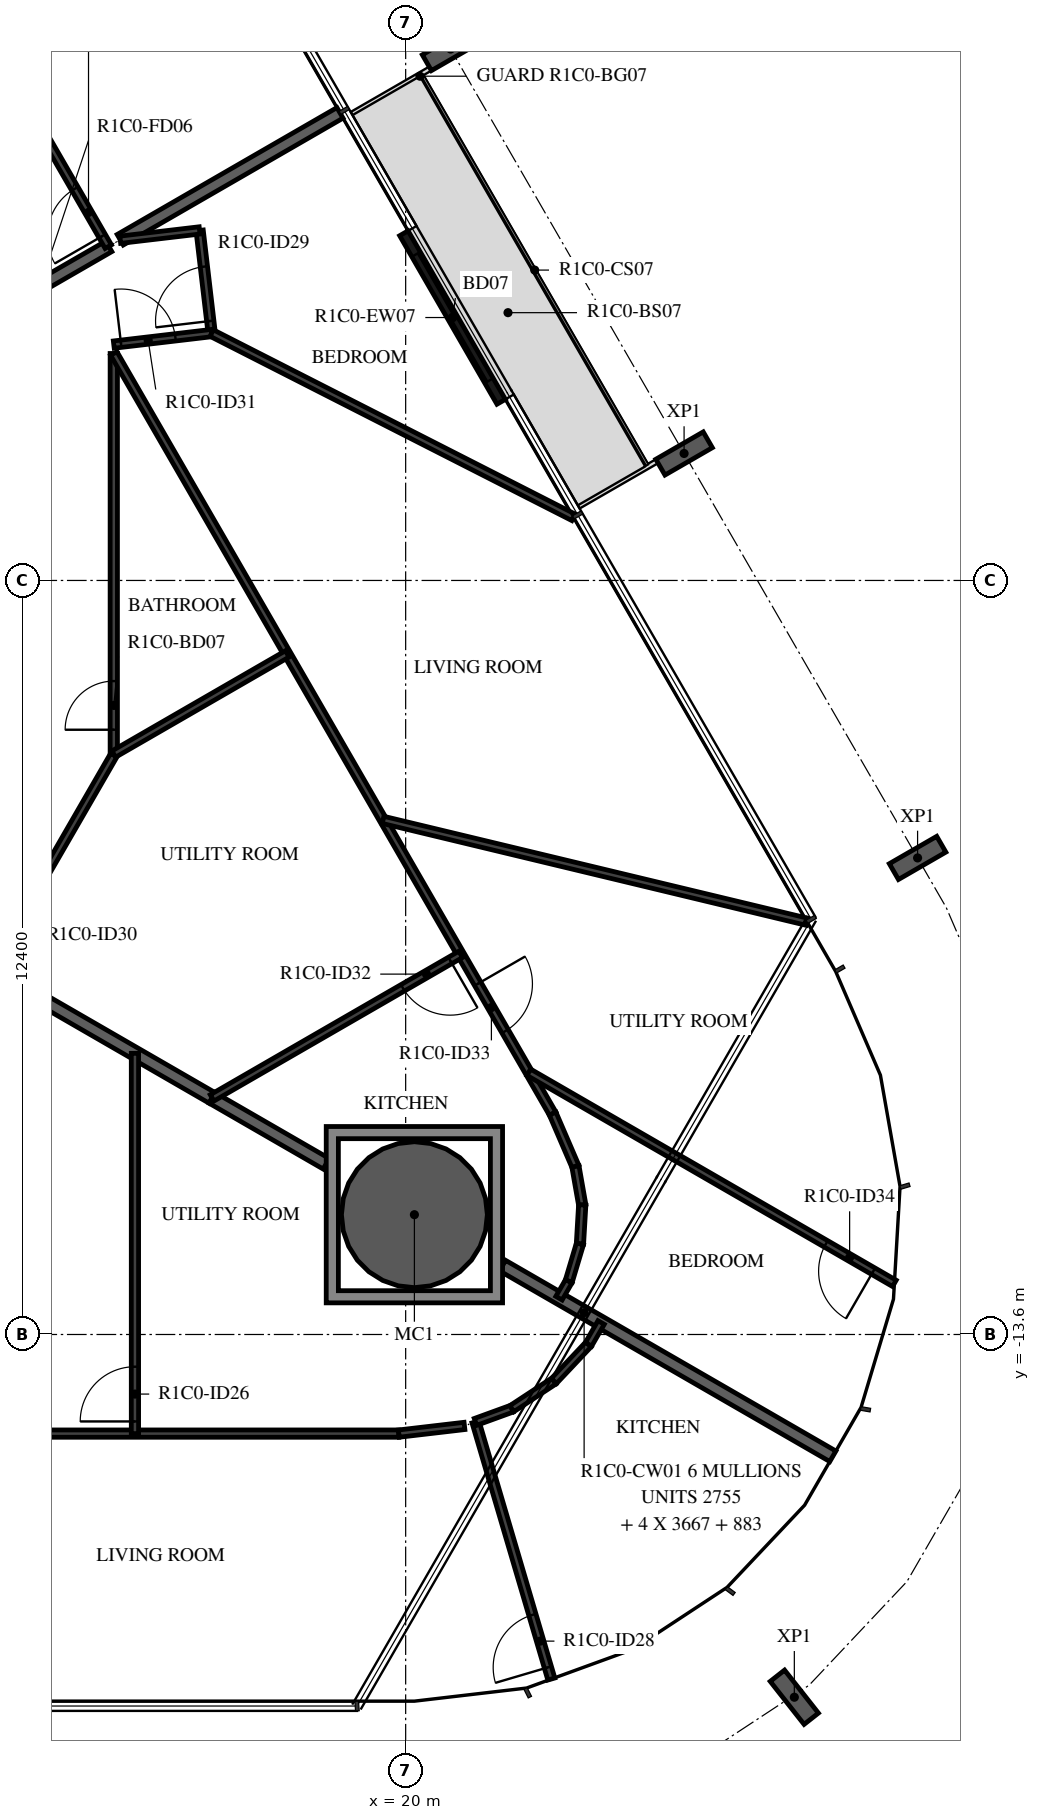
"""IFC4 building model, lengths in metres.
Left out: names, types, materials, properties, quantities, classifications, styles, units other than length and angle.
Written with IfcOpenShell. Run it as: python <this file> out.ifc"""

import sys

from ifc_helpers import new_model, si_unit, direction, frame, frame_2d, origin, origin_2d, place, context, subcontext, project, spatial, polyline, rectangle, hollow_circle, i_section, outline, extrude, element, fill, save


model = new_model("IFC4")
c1 = context("Model", 3, precision=1e-05, world=origin(), true_north=direction((0.0, 1.0)))
c2 = subcontext(c1, "Body", "Model", "MODEL_VIEW")
j1 = project(units=[si_unit("LENGTHUNIT", "METRE"), si_unit("PLANEANGLEUNIT", "RADIAN")], contexts=[c1])
p1 = place(None, origin())
s1 = spatial("IfcSite", under=j1, at=p1, CompositionType="ELEMENT")
p2 = place(p1, origin())
s2 = spatial("IfcBuilding", under=s1, at=p2, CompositionType="ELEMENT")
p3 = place(p2, frame((0.0, 0.0, 66.4)))
s3 = spatial("IfcBuildingStorey", under=s2, at=p3, CompositionType="ELEMENT", Elevation=66.4)
p4 = place(p3, frame((20.144, -11.63, -0.38), z_axis=(0.0, 0.0, 1.0), x_axis=(1.0, 0.0, 0.0)))
e1 = element("IfcColumn", 1, at=p4, inside=s3, PredefinedType="COLUMN", context=c2, shape_type="SweptSolid", body=[
    extrude(hollow_circle(Radius=1.2, WallThickness=0.06, at=origin_2d()), origin(), (0.0, 0.0, 1.0), 2.616),
])
for number, where, z_axis, x_axis in (
    (2, (26.392, -19.565, -0.38), (0.0, 0.0, 1.0), (-0.786, -0.619, 0.0)),
    (3, (28.419, -5.763, -0.38), (0.0, 0.0, 1.0), (0.5, -0.866, 0.0)),
    (4, (24.579, 0.888, -0.38), (0.0, 0.0, 1.0), (0.5, -0.866, 0.0)),
    (5, (20.739, 7.539, -0.38), (0.0, 0.0, 1.0), (0.5, -0.866, 0.0)),
):
    element("IfcColumn", number, at=place(p3, frame(where, z_axis=z_axis, x_axis=x_axis)), inside=s3, PredefinedType="COLUMN", context=c2, shape_type="SweptSolid", body=[
        extrude(i_section(OverallWidth=0.3, OverallDepth=0.9, WebThickness=0.019, FlangeThickness=0.035, FilletRadius=0.03, at=origin_2d()), origin(), (0.0, 0.0, 1.0), 2.616),
    ])
p5 = place(p3, frame((21.571, 1.738, 0.0), z_axis=(0.0, 0.0, 1.0), x_axis=(-0.500028443584, 0.866008981251, 0.0)))
e6 = element("IfcWall", 6, at=p5, inside=s3, PredefinedType="STANDARD", context=c2, shape_type="SweptSolid", body=[
    extrude(rectangle(XDim=3.2, YDim=0.16, at=frame_2d((1.6, 0.0))), origin(), (0.0, 0.0, 1.0), 3.05),
])
p6 = place(p5, frame((0.4, 0.0, 0.0)))
e7 = element("IfcOpeningElement", 7, at=p6, cuts=e6, PredefinedType="OPENING", context=c2, shape_type="SweptSolid", body=[
    extrude(rectangle(XDim=2.4, YDim=2.4, at=frame_2d((1.2, 1.2))), frame((0.0, 0.09, 0.0), z_axis=(0.0, -1.0, 0.0), x_axis=(1.0, 0.0, 0.0)), (0.0, 0.0, 1.0), 0.18),
])
p7 = place(p3, frame((13.7, 3.476, 0.0), z_axis=(0.0, 0.0, 1.0), x_axis=(0.866014281772, 0.500019263395, 0.0)))
e8 = element("IfcWall", 8, at=p7, inside=s3, PredefinedType="STANDARD", context=c2, shape_type="SweptSolid", body=[
    extrude(rectangle(XDim=1.638, YDim=0.2, at=frame_2d((0.819, 0.0))), origin(), (0.0, 0.0, 1.0), 3.05),
])
p8 = place(p3, frame((15.306, 4.403, 0.0), z_axis=(0.0, 0.0, 1.0), x_axis=(0.866013143551, 0.500021234745, 0.0)))
e9 = element("IfcWall", 9, at=p8, inside=s3, PredefinedType="STANDARD", context=c2, shape_type="SweptSolid", body=[
    extrude(rectangle(XDim=4.173, YDim=0.2, at=frame_2d((2.086, 0.0))), origin(), (0.0, 0.0, 1.0), 3.05),
])
p9 = place(p3, frame((16.817, -9.709, 0.0), z_axis=(0.0, 0.0, 1.0), x_axis=(-0.86604338933, 0.499968846828, 0.0)))
e10 = element("IfcWall", 10, at=p9, inside=s3, PredefinedType="STANDARD", context=c2, shape_type="SweptSolid", body=[
    extrude(rectangle(XDim=5.718, YDim=0.2, at=frame_2d((2.859, 0.0))), origin(), (0.0, 0.0, 1.0), 3.05),
])
p10 = place(p3, frame((27.025, -15.603, 0.0), z_axis=(0.0, 0.0, 1.0), x_axis=(-0.866030653443, 0.499990907215, 0.0)))
e11 = element("IfcWall", 11, at=p10, inside=s3, PredefinedType="STANDARD", context=c2, shape_type="SweptSolid", body=[
    extrude(rectangle(XDim=6.271, YDim=0.2, at=frame_2d((3.136, 0.0))), origin(), (0.0, 0.0, 1.0), 3.05),
])
p11 = place(p3, frame((18.694, -10.793, 0.0), z_axis=(0.0, 0.0, 1.0), x_axis=(-0.866009251978, 0.500027974705, 0.0)))
e12 = element("IfcWall", 12, at=p11, inside=s3, PredefinedType="STANDARD", context=c2, shape_type="SweptSolid", body=[
    extrude(rectangle(XDim=2.167, YDim=0.2, at=frame_2d((1.084, 0.0))), origin(), (0.0, 0.0, 1.0), 3.05),
])
p12 = place(p3, frame((15.11, 4.289, 0.0), z_axis=(0.0, 0.0, 1.0), x_axis=(-0.500033654285, 0.866005972602, 0.0)))
e13 = element("IfcWall", 13, at=p12, inside=s3, PredefinedType="PARTITIONING", context=c2, shape_type="SweptSolid", body=[
    extrude(rectangle(XDim=5.003, YDim=0.12, at=frame_2d((2.501, 0.0))), origin(), (0.0, 0.0, 1.0), 3.05),
])
p13 = place(p12, frame((0.2, 0.0, 0.0)))
e14 = element("IfcOpeningElement", 14, at=p13, cuts=e13, PredefinedType="OPENING", context=c2, shape_type="SweptSolid", body=[
    extrude(rectangle(XDim=0.9, YDim=2.1, at=frame_2d((0.45, 1.05))), frame((0.0, 0.07, 0.0), z_axis=(0.0, -1.0, 0.0), x_axis=(1.0, 0.0, 0.0)), (0.0, 0.0, 1.0), 0.14),
])
p14 = place(p3, frame((7.881, -15.23, 0.0), z_axis=(0.0, 0.0, 1.0), x_axis=(1.0, 0.0, 0.0)))
e15 = element("IfcWall", 15, at=p14, inside=s3, PredefinedType="PARTITIONING", context=c2, shape_type="SweptSolid", body=[
    extrude(rectangle(XDim=12.006, YDim=0.12, at=frame_2d((6.003, 0.0))), origin(), (0.0, 0.0, 1.0), 3.05),
])
p15 = place(p14, frame((1.499, 0.0, 0.0)))
e16 = element("IfcOpeningElement", 16, at=p15, cuts=e15, PredefinedType="OPENING", context=c2, shape_type="SweptSolid", body=[
    extrude(rectangle(XDim=0.9, YDim=2.1, at=frame_2d((0.45, 1.05))), frame((0.0, 0.07, 0.0), z_axis=(0.0, -1.0, 0.0), x_axis=(1.0, 0.0, 0.0)), (0.0, 0.0, 1.0), 0.14),
])
p16 = place(p3, frame((15.548, -15.23, 0.0), z_axis=(0.0, 0.0, 1.0), x_axis=(0.0, 1.0, 0.0)))
e17 = element("IfcWall", 17, at=p16, inside=s3, PredefinedType="PARTITIONING", context=c2, shape_type="SweptSolid", body=[
    extrude(rectangle(XDim=6.253, YDim=0.12, at=frame_2d((3.127, 0.0))), origin(), (0.0, 0.0, 1.0), 3.05),
])
p17 = place(p16, frame((0.2, 0.0, 0.0)))
e18 = element("IfcOpeningElement", 18, at=p17, cuts=e17, PredefinedType="OPENING", context=c2, shape_type="SweptSolid", body=[
    extrude(rectangle(XDim=0.9, YDim=2.1, at=frame_2d((0.45, 1.05))), frame((0.0, 0.07, 0.0), z_axis=(0.0, -1.0, 0.0), x_axis=(1.0, 0.0, 0.0)), (0.0, 0.0, 1.0), 0.14),
])
p18 = place(p3, frame((20.967, -15.104, 0.0), z_axis=(0.0, 0.0, 1.0), x_axis=(-0.993231641151, -0.116150363826, 0.0)))
e19 = element("IfcWall", 19, at=p18, inside=s3, PredefinedType="PARTITIONING", context=c2, shape_type="SweptSolid", body=[
    extrude(rectangle(XDim=1.087, YDim=0.12, at=frame_2d((0.543, 0.0))), origin(), (0.0, 0.0, 1.0), 3.05),
])
p19 = place(p3, frame((22.396, -19.266, 0.0), z_axis=(0.0, 0.0, 1.0), x_axis=(-0.282873823334, 0.959157130022, 0.0)))
e20 = element("IfcWall", 20, at=p19, inside=s3, PredefinedType="PARTITIONING", context=c2, shape_type="SweptSolid", body=[
    extrude(rectangle(XDim=4.409, YDim=0.12, at=frame_2d((2.204, 0.0))), origin(), (0.0, 0.0, 1.0), 3.05),
])
p20 = place(p19, frame((0.2, 0.0, 0.0)))
e21 = element("IfcOpeningElement", 21, at=p20, cuts=e20, PredefinedType="OPENING", context=c2, shape_type="SweptSolid", body=[
    extrude(rectangle(XDim=0.9, YDim=2.1, at=frame_2d((0.45, 1.05))), frame((0.0, 0.07, 0.0), z_axis=(0.0, -1.0, 0.0), x_axis=(1.0, 0.0, 0.0)), (0.0, 0.0, 1.0), 0.14),
])
p21 = place(p3, frame((21.149, -15.038, 0.0), z_axis=(0.0, 0.0, 1.0), x_axis=(0.939726102094, 0.341928140173, 0.0)))
e22 = element("IfcWall", 22, at=p21, inside=s3, PredefinedType="PARTITIONING", context=c2, shape_type="SweptSolid", body=[
    extrude(rectangle(XDim=0.635, YDim=0.12, at=frame_2d((0.318, 0.0))), origin(), (0.0, 0.0, 1.0), 3.05),
])
p22 = place(p3, frame((21.746, -14.82, 0.0), z_axis=(0.0, 0.0, 1.0), x_axis=(0.835477570013, 0.549524549046, 0.0)))
e23 = element("IfcWall", 23, at=p22, inside=s3, PredefinedType="PARTITIONING", context=c2, shape_type="SweptSolid", body=[
    extrude(rectangle(XDim=0.829, YDim=0.12, at=frame_2d((0.415, 0.0))), origin(), (0.0, 0.0, 1.0), 3.05),
])
p23 = place(p3, frame((22.438, -14.365, 0.0), z_axis=(0.0, 0.0, 1.0), x_axis=(0.686182189596, 0.727429723535, 0.0)))
e24 = element("IfcWall", 24, at=p23, inside=s3, PredefinedType="PARTITIONING", context=c2, shape_type="SweptSolid", body=[
    extrude(rectangle(XDim=0.829, YDim=0.12, at=frame_2d((0.414, 0.0))), origin(), (0.0, 0.0, 1.0), 3.05),
])
p24 = place(p3, frame((23.007, -13.762, 0.0), z_axis=(0.0, 0.0, 1.0), x_axis=(0.499875358948, 0.866097353371, 0.0)))
e25 = element("IfcWall", 25, at=p24, inside=s3, PredefinedType="PARTITIONING", context=c2, shape_type="SweptSolid", body=[
    extrude(rectangle(XDim=0.415, YDim=0.12, at=frame_2d((0.207, 0.0))), origin(), (0.0, 0.0, 1.0), 3.05),
])
p25 = place(p3, frame((16.81, 2.868, 0.0), z_axis=(0.0, 0.0, 1.0), x_axis=(-0.117049566217, 0.993126074096, 0.0)))
e26 = element("IfcWall", 26, at=p25, inside=s3, PredefinedType="PARTITIONING", context=c2, shape_type="SweptSolid", body=[
    extrude(rectangle(XDim=1.7, YDim=0.12, at=frame_2d((0.85, 0.0))), origin(), (0.0, 0.0, 1.0), 3.05),
])
p26 = place(p25, frame((0.2, 0.0, 0.0)))
e27 = element("IfcOpeningElement", 27, at=p26, cuts=e26, PredefinedType="OPENING", context=c2, shape_type="SweptSolid", body=[
    extrude(rectangle(XDim=0.9, YDim=2.1, at=frame_2d((0.45, 1.05))), frame((0.0, 0.07, 0.0), z_axis=(0.0, -1.0, 0.0), x_axis=(1.0, 0.0, 0.0)), (0.0, 0.0, 1.0), 0.14),
])
p27 = place(p3, frame((16.611, 4.556, 0.0), z_axis=(0.0, 0.0, 1.0), x_axis=(-0.993151872114, -0.116830470836, 0.0)))
e28 = element("IfcWall", 28, at=p27, inside=s3, PredefinedType="PARTITIONING", context=c2, shape_type="SweptSolid", body=[
    extrude(rectangle(XDim=1.314, YDim=0.12, at=frame_2d((0.657, 0.0))), origin(), (0.0, 0.0, 1.0), 3.05),
])
p28 = place(p3, frame((13.164, -7.6, 0.0), z_axis=(0.0, 0.0, 1.0), x_axis=(0.499974973053, 0.866039852617, 0.0)))
e29 = element("IfcWall", 29, at=p28, inside=s3, PredefinedType="PARTITIONING", context=c2, shape_type="SweptSolid", body=[
    extrude(rectangle(XDim=4.073, YDim=0.12, at=frame_2d((2.037, 0.0))), origin(), (0.0, 0.0, 1.0), 3.05),
])
p29 = place(p28, frame((0.2, 0.0, 0.0)))
e30 = element("IfcOpeningElement", 30, at=p29, cuts=e29, PredefinedType="OPENING", context=c2, shape_type="SweptSolid", body=[
    extrude(rectangle(XDim=0.9, YDim=2.1, at=frame_2d((0.45, 1.05))), frame((0.0, 0.07, 0.0), z_axis=(0.0, -1.0, 0.0), x_axis=(1.0, 0.0, 0.0)), (0.0, 0.0, 1.0), 0.14),
])
p30 = place(p3, frame((15.2, 2.679, 0.0), z_axis=(0.0, 0.0, 1.0), x_axis=(0.993150604323, 0.116841247567, 0.0)))
e31 = element("IfcWall", 31, at=p30, inside=s3, PredefinedType="PARTITIONING", context=c2, shape_type="SweptSolid", body=[
    extrude(rectangle(XDim=1.621, YDim=0.12, at=frame_2d((0.811, 0.0))), origin(), (0.0, 0.0, 1.0), 3.05),
])
p31 = place(p30, frame((0.12, 0.0, 0.0)))
e32 = element("IfcOpeningElement", 32, at=p31, cuts=e31, PredefinedType="OPENING", context=c2, shape_type="SweptSolid", body=[
    extrude(rectangle(XDim=0.9, YDim=2.1, at=frame_2d((0.45, 1.05))), frame((0.0, 0.07, 0.0), z_axis=(0.0, -1.0, 0.0), x_axis=(1.0, 0.0, 0.0)), (0.0, 0.0, 1.0), 0.14),
])
p32 = place(p3, frame((15.2, -4.055, 0.0), z_axis=(0.0, 0.0, 1.0), x_axis=(0.0, 1.0, 0.0)))
e33 = element("IfcWall", 33, at=p32, inside=s3, PredefinedType="PARTITIONING", context=c2, shape_type="SweptSolid", body=[
    extrude(rectangle(XDim=6.588, YDim=0.12, at=frame_2d((3.294, 0.0))), origin(), (0.0, 0.0, 1.0), 3.05),
])
p33 = place(p32, frame((0.4, 0.0, 0.0)))
e34 = element("IfcOpeningElement", 34, at=p33, cuts=e33, PredefinedType="OPENING", context=c2, shape_type="SweptSolid", body=[
    extrude(rectangle(XDim=0.8, YDim=2.1, at=frame_2d((0.4, 1.05))), frame((0.0, 0.07, 0.0), z_axis=(0.0, -1.0, 0.0), x_axis=(1.0, 0.0, 0.0)), (0.0, 0.0, 1.0), 0.14),
])
p34 = place(p3, frame((16.81, 2.868, 0.0), z_axis=(0.0, 0.0, 1.0), x_axis=(0.891097252128, -0.453812392128, 0.0)))
e35 = element("IfcWall", 35, at=p34, inside=s3, PredefinedType="PARTITIONING", context=c2, shape_type="SweptSolid", body=[
    extrude(rectangle(XDim=6.677, YDim=0.12, at=frame_2d((3.338, 0.0))), origin(), (0.0, 0.0, 1.0), 3.05),
])
p35 = place(p3, frame((15.2, 2.533, 0.0), z_axis=(0.0, 0.0, 1.0), x_axis=(0.500001127339, -0.866024752914, 0.0)))
e36 = element("IfcWall", 36, at=p35, inside=s3, PredefinedType="PARTITIONING", context=c2, shape_type="SweptSolid", body=[
    extrude(rectangle(XDim=14.434, YDim=0.12, at=frame_2d((7.217, 0.0))), origin(), (0.0, 0.0, 1.0), 3.05),
])
p36 = place(p35, frame((11.97, 0.0, 0.0)))
e37 = element("IfcOpeningElement", 37, at=p36, cuts=e36, PredefinedType="OPENING", context=c2, shape_type="SweptSolid", body=[
    extrude(rectangle(XDim=0.9, YDim=2.1, at=frame_2d((0.45, 1.05))), frame((0.0, 0.07, 0.0), z_axis=(0.0, -1.0, 0.0), x_axis=(1.0, 0.0, 0.0)), (0.0, 0.0, 1.0), 0.14),
])
p37 = place(p3, frame((22.417, -9.968, 0.0), z_axis=(0.0, 0.0, 1.0), x_axis=(0.395971779074, -0.918262680379, 0.0)))
e38 = element("IfcWall", 38, at=p37, inside=s3, PredefinedType="PARTITIONING", context=c2, shape_type="SweptSolid", body=[
    extrude(rectangle(XDim=0.947, YDim=0.12, at=frame_2d((0.474, 0.0))), origin(), (0.0, 0.0, 1.0), 3.05),
])
p38 = place(p3, frame((22.792, -10.837, 0.0), z_axis=(0.0, 0.0, 1.0), x_axis=(0.17382873157, -0.984775899421, 0.0)))
e39 = element("IfcWall", 39, at=p38, inside=s3, PredefinedType="PARTITIONING", context=c2, shape_type="SweptSolid", body=[
    extrude(rectangle(XDim=0.642, YDim=0.12, at=frame_2d((0.321, 0.0))), origin(), (0.0, 0.0, 1.0), 3.05),
])
p39 = place(p3, frame((22.904, -11.469, 0.0), z_axis=(0.0, 0.0, 1.0), x_axis=(-0.05820906079, -0.998304415117, 0.0)))
e40 = element("IfcWall", 40, at=p39, inside=s3, PredefinedType="PARTITIONING", context=c2, shape_type="SweptSolid", body=[
    extrude(rectangle(XDim=0.642, YDim=0.12, at=frame_2d((0.321, 0.0))), origin(), (0.0, 0.0, 1.0), 3.05),
])
p40 = place(p3, frame((22.866, -12.11, 0.0), z_axis=(0.0, 0.0, 1.0), x_axis=(-0.286754684479, -0.958004045362, 0.0)))
e41 = element("IfcWall", 41, at=p40, inside=s3, PredefinedType="PARTITIONING", context=c2, shape_type="SweptSolid", body=[
    extrude(rectangle(XDim=0.642, YDim=0.12, at=frame_2d((0.321, 0.0))), origin(), (0.0, 0.0, 1.0), 3.05),
])
p41 = place(p3, frame((22.682, -12.725, 0.0), z_axis=(0.0, 0.0, 1.0), x_axis=(-0.500226934229, -0.865894343596, 0.0)))
e42 = element("IfcWall", 42, at=p41, inside=s3, PredefinedType="PARTITIONING", context=c2, shape_type="SweptSolid", body=[
    extrude(rectangle(XDim=0.321, YDim=0.12, at=frame_2d((0.161, 0.0))), origin(), (0.0, 0.0, 1.0), 3.05),
])
p42 = place(p3, frame((28.037, -12.759, 0.0), z_axis=(0.0, 0.0, 1.0), x_axis=(-0.866009909538, 0.500026835863, 0.0)))
e43 = element("IfcWall", 43, at=p42, inside=s3, PredefinedType="PARTITIONING", context=c2, shape_type="SweptSolid", body=[
    extrude(rectangle(XDim=6.943, YDim=0.12, at=frame_2d((3.471, 0.0))), origin(), (0.0, 0.0, 1.0), 3.05),
])
p43 = place(p42, frame((0.4, 0.0, 0.0)))
e44 = element("IfcOpeningElement", 44, at=p43, cuts=e43, PredefinedType="OPENING", context=c2, shape_type="SweptSolid", body=[
    extrude(rectangle(XDim=0.9, YDim=2.1, at=frame_2d((0.45, 1.05))), frame((0.0, 0.07, 0.0), z_axis=(0.0, -1.0, 0.0), x_axis=(1.0, 0.0, 0.0)), (0.0, 0.0, 1.0), 0.14),
])
p44 = place(p3, frame((20.905, -7.349, 0.0), z_axis=(0.0, 0.0, 1.0), x_axis=(-0.866032292145, -0.49998806882, 0.0)))
e45 = element("IfcWall", 45, at=p44, inside=s3, PredefinedType="PARTITIONING", context=c2, shape_type="SweptSolid", body=[
    extrude(rectangle(XDim=4.721, YDim=0.12, at=frame_2d((2.36, 0.0))), origin(), (0.0, 0.0, 1.0), 3.05),
])
p45 = place(p44, frame((0.2, 0.0, 0.0)))
e46 = element("IfcOpeningElement", 46, at=p45, cuts=e45, PredefinedType="OPENING", context=c2, shape_type="SweptSolid", body=[
    extrude(rectangle(XDim=0.9, YDim=2.1, at=frame_2d((0.45, 1.05))), frame((0.0, 0.07, 0.0), z_axis=(0.0, -1.0, 0.0), x_axis=(1.0, 0.0, 0.0)), (0.0, 0.0, 1.0), 0.14),
])
p46 = place(p3, frame((18.052, -2.408, 0.0), z_axis=(0.0, 0.0, 1.0), x_axis=(-0.866017718408, -0.500013311227, 0.0)))
e47 = element("IfcWall", 47, at=p46, inside=s3, PredefinedType="PARTITIONING", context=c2, shape_type="SweptSolid", body=[
    extrude(rectangle(XDim=3.294, YDim=0.12, at=frame_2d((1.647, 0.0))), origin(), (0.0, 0.0, 1.0), 3.05),
])
p47 = place(p3, frame((26.6, -6.813, 0.0), z_axis=(0.0, 0.0, 1.0), x_axis=(-0.972307508101, 0.23370517686, 0.0)))
e48 = element("IfcWall", 48, at=p47, inside=s3, PredefinedType="PARTITIONING", context=c2, shape_type="SweptSolid", body=[
    extrude(rectangle(XDim=7.17, YDim=0.12, at=frame_2d((3.585, 0.0))), origin(), (0.0, 0.0, 1.0), 3.05),
])
p48 = place(p3, origin())
e49 = element("IfcWall", 49, at=p48, inside=s3, PredefinedType="STANDARD", context=c2, shape_type="SweptSolid", body=[
    extrude(outline(polyline([(21.594, -10.18), (21.594, -13.08), (18.694, -13.08), (18.694, -10.18), (21.594, -10.18)]), holes=[polyline([(18.894, -12.88), (21.394, -12.88), (21.394, -10.38), (18.894, -10.38), (18.894, -12.88)])]), origin(), (0.0, 0.0, 1.0), 3.05),
])
p49 = place(p6, origin())
e50 = element("IfcDoor", 50, at=p49, inside=s3, OperationType="DOUBLE_DOOR_SLIDING", PredefinedType="DOOR", context=c2, shape_type="SweptSolid", body=[
    extrude(rectangle(XDim=2.4, YDim=2.4, at=frame_2d((1.2, 1.2))), frame((0.0, 0.025, 0.0), z_axis=(0.0, -1.0, 0.0), x_axis=(1.0, 0.0, 0.0)), (0.0, 0.0, 1.0), 0.05),
])
fill(e7, e50)
p50 = place(p13, origin())
e51 = element("IfcDoor", 51, at=p50, inside=s3, OperationType="SINGLE_SWING_LEFT", PredefinedType="DOOR", context=c2, shape_type="SweptSolid", body=[
    extrude(rectangle(XDim=0.9, YDim=2.1, at=frame_2d((0.45, 1.05))), frame((0.0, 0.025, 0.0), z_axis=(0.0, -1.0, 0.0), x_axis=(1.0, 0.0, 0.0)), (0.0, 0.0, 1.0), 0.05),
])
fill(e14, e51)
p51 = place(p17, origin())
e52 = element("IfcDoor", 52, at=p51, inside=s3, OperationType="SINGLE_SWING_RIGHT", PredefinedType="DOOR", context=c2, shape_type="SweptSolid", body=[
    extrude(rectangle(XDim=0.9, YDim=2.1, at=frame_2d((0.45, 1.05))), frame((0.0, 0.025, 0.0), z_axis=(0.0, -1.0, 0.0), x_axis=(1.0, 0.0, 0.0)), (0.0, 0.0, 1.0), 0.05),
])
fill(e18, e52)
p52 = place(p20, origin())
e53 = element("IfcDoor", 53, at=p52, inside=s3, OperationType="SINGLE_SWING_RIGHT", PredefinedType="DOOR", context=c2, shape_type="SweptSolid", body=[
    extrude(rectangle(XDim=0.9, YDim=2.1, at=frame_2d((0.45, 1.05))), frame((0.0, 0.025, 0.0), z_axis=(0.0, -1.0, 0.0), x_axis=(1.0, 0.0, 0.0)), (0.0, 0.0, 1.0), 0.05),
])
fill(e21, e53)
p53 = place(p26, origin())
e54 = element("IfcDoor", 54, at=p53, inside=s3, OperationType="SINGLE_SWING_LEFT", PredefinedType="DOOR", context=c2, shape_type="SweptSolid", body=[
    extrude(rectangle(XDim=0.9, YDim=2.1, at=frame_2d((0.45, 1.05))), frame((0.0, 0.025, 0.0), z_axis=(0.0, -1.0, 0.0), x_axis=(1.0, 0.0, 0.0)), (0.0, 0.0, 1.0), 0.05),
])
fill(e27, e54)
p54 = place(p31, origin())
e55 = element("IfcDoor", 55, at=p54, inside=s3, OperationType="SINGLE_SWING_RIGHT", PredefinedType="DOOR", context=c2, shape_type="SweptSolid", body=[
    extrude(rectangle(XDim=0.9, YDim=2.1, at=frame_2d((0.45, 1.05))), frame((0.0, 0.025, 0.0), z_axis=(0.0, -1.0, 0.0), x_axis=(1.0, 0.0, 0.0)), (0.0, 0.0, 1.0), 0.05),
])
fill(e32, e55)
p55 = place(p33, origin())
e56 = element("IfcDoor", 56, at=p55, inside=s3, OperationType="SINGLE_SWING_LEFT", PredefinedType="DOOR", context=c2, shape_type="SweptSolid", body=[
    extrude(rectangle(XDim=0.8, YDim=2.1, at=frame_2d((0.4, 1.05))), frame((0.0, 0.025, 0.0), z_axis=(0.0, -1.0, 0.0), x_axis=(1.0, 0.0, 0.0)), (0.0, 0.0, 1.0), 0.05),
])
fill(e34, e56)
p56 = place(p45, origin())
e57 = element("IfcDoor", 57, at=p56, inside=s3, OperationType="SINGLE_SWING_LEFT", PredefinedType="DOOR", context=c2, shape_type="SweptSolid", body=[
    extrude(rectangle(XDim=0.9, YDim=2.1, at=frame_2d((0.45, 1.05))), frame((0.0, 0.025, 0.0), z_axis=(0.0, -1.0, 0.0), x_axis=(1.0, 0.0, 0.0)), (0.0, 0.0, 1.0), 0.05),
])
fill(e46, e57)
p57 = place(p36, origin())
e58 = element("IfcDoor", 58, at=p57, inside=s3, OperationType="SINGLE_SWING_LEFT", PredefinedType="DOOR", context=c2, shape_type="SweptSolid", body=[
    extrude(rectangle(XDim=0.9, YDim=2.1, at=frame_2d((0.45, 1.05))), frame((0.0, 0.025, 0.0), z_axis=(0.0, -1.0, 0.0), x_axis=(1.0, 0.0, 0.0)), (0.0, 0.0, 1.0), 0.05),
])
fill(e37, e58)
p58 = place(p43, origin())
e59 = element("IfcDoor", 59, at=p58, inside=s3, OperationType="SINGLE_SWING_LEFT", PredefinedType="DOOR", context=c2, shape_type="SweptSolid", body=[
    extrude(rectangle(XDim=0.9, YDim=2.1, at=frame_2d((0.45, 1.05))), frame((0.0, 0.025, 0.0), z_axis=(0.0, -1.0, 0.0), x_axis=(1.0, 0.0, 0.0)), (0.0, 0.0, 1.0), 0.05),
])
fill(e44, e59)
save(model, sys.argv[1])
